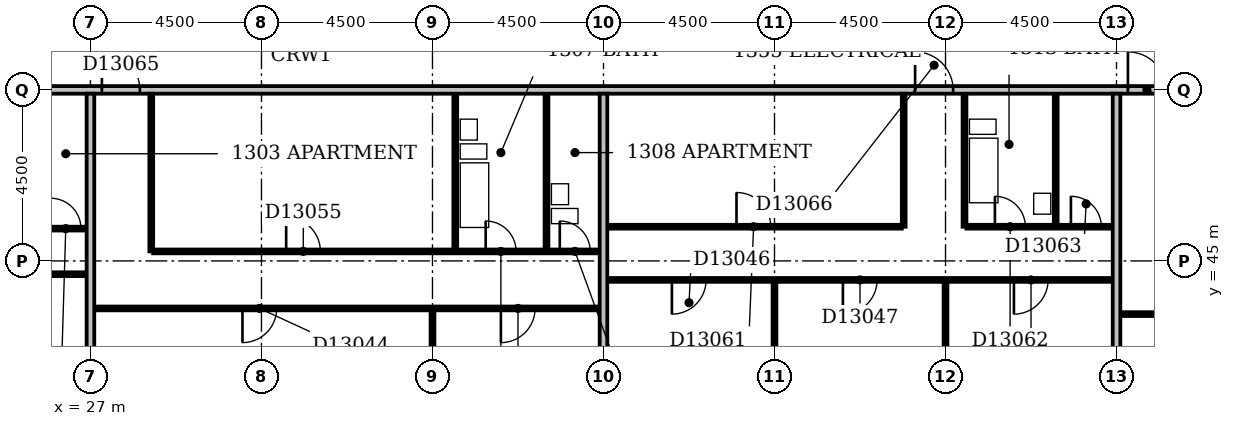
"""IFC4 building model, lengths in metres.
Left out: names, types, materials, properties, quantities, classifications, styles, units other than length and angle.
Written with IfcOpenShell. Run it as: python <this file> out.ifc"""

import sys

from ifc_helpers import new_model, si_unit, direction, frame, frame_2d, origin, place, context, subcontext, project, spatial, rectangle, extrude, element, fill, save


model = new_model("IFC4")
c1 = context("Model", 3, precision=1e-05, world=origin(), true_north=direction((0.0, 1.0)))
c2 = subcontext(c1, "Body", "Model", "MODEL_VIEW")
j1 = project(units=[si_unit("LENGTHUNIT", "METRE"), si_unit("PLANEANGLEUNIT", "RADIAN")], contexts=[c1])
p1 = place(None, origin())
s1 = spatial("IfcSite", under=j1, at=p1, CompositionType="ELEMENT")
p2 = place(p1, origin())
s2 = spatial("IfcBuilding", under=s1, at=p2, CompositionType="ELEMENT")
p3 = place(p2, frame((0.0, 0.0, 57.8)))
s3 = spatial("IfcBuildingStorey", under=s2, at=p3, CompositionType="ELEMENT", Elevation=57.8)
p4 = place(p3, frame((27.0, 36.6, 0.0), z_axis=(0.0, 0.0, 1.0), x_axis=(0.0, 1.0, 0.0)))
e1 = element("IfcWall", 1, at=p4, inside=s3, PredefinedType="PARTITIONING", context=c2, shape_type="SweptSolid", body=[
    extrude(rectangle(XDim=12.8, YDim=0.2, at=frame_2d((6.4, 0.0))), origin(), (0.0, 0.0, 1.0), 2.6),
])
p5 = place(p3, frame((36.0, 36.6, 0.0), z_axis=(0.0, 0.0, 1.0), x_axis=(0.0, 1.0, 0.0)))
e2 = element("IfcWall", 2, at=p5, inside=s3, PredefinedType="PARTITIONING", context=c2, shape_type="SweptSolid", body=[
    extrude(rectangle(XDim=7.1, YDim=0.1, at=frame_2d((3.55, 0.0))), origin(), (0.0, 0.0, 1.0), 2.4),
])
p6 = place(p3, frame((40.5, 36.6, 0.0), z_axis=(0.0, 0.0, 1.0), x_axis=(0.0, 1.0, 0.0)))
e3 = element("IfcWall", 3, at=p6, inside=s3, PredefinedType="PARTITIONING", context=c2, shape_type="SweptSolid", body=[
    extrude(rectangle(XDim=12.8, YDim=0.2, at=frame_2d((6.4, 0.0))), origin(), (0.0, 0.0, 1.0), 3.3),
])
p7 = place(p3, frame((45.0, 36.6, 0.0), z_axis=(0.0, 0.0, 1.0), x_axis=(0.0, 1.0, 0.0)))
e4 = element("IfcWall", 4, at=p7, inside=s3, PredefinedType="PARTITIONING", context=c2, shape_type="SweptSolid", body=[
    extrude(rectangle(XDim=7.85, YDim=0.1, at=frame_2d((3.925, 0.0))), origin(), (0.0, 0.0, 1.0), 2.6),
])
p8 = place(p3, frame((49.5, 36.6, 0.0), z_axis=(0.0, 0.0, 1.0), x_axis=(0.0, 1.0, 0.0)))
e5 = element("IfcWall", 5, at=p8, inside=s3, PredefinedType="PARTITIONING", context=c2, shape_type="SweptSolid", body=[
    extrude(rectangle(XDim=7.85, YDim=0.1, at=frame_2d((3.925, 0.0))), origin(), (0.0, 0.0, 1.0), 3.3),
])
p9 = place(p3, frame((54.0, 36.6, 0.0), z_axis=(0.0, 0.0, 1.0), x_axis=(0.0, 1.0, 0.0)))
e6 = element("IfcWall", 6, at=p9, inside=s3, PredefinedType="PARTITIONING", context=c2, shape_type="SweptSolid", body=[
    extrude(rectangle(XDim=12.8, YDim=0.2, at=frame_2d((6.4, 0.0))), origin(), (0.0, 0.0, 1.0), 2.6),
])
p10 = place(p3, frame((54.1, 43.6, 0.0), z_axis=(0.0, 0.0, 1.0), x_axis=(1.0, 0.0, 0.0)))
e7 = element("IfcWall", 7, at=p10, inside=s3, PredefinedType="PARTITIONING", context=c2, shape_type="SweptSolid", body=[
    extrude(rectangle(XDim=8.8, YDim=0.1, at=frame_2d((4.4, 0.0))), origin(), (0.0, 0.0, 1.0), 3.3),
])
p11 = place(p10, frame((1.7, 0.0, 0.0)))
e8 = element("IfcOpeningElement", 8, at=p11, cuts=e7, PredefinedType="OPENING", context=c2, shape_type="SweptSolid", body=[
    extrude(rectangle(XDim=0.9, YDim=2.1, at=frame_2d((0.45, 1.05))), frame((0.0, 0.062, 0.0), z_axis=(0.0, -1.0, 0.0), x_axis=(1.0, 0.0, 0.0)), (0.0, 0.0, 1.0), 0.124),
])
p12 = place(p10, frame((6.2, 0.0, 0.0)))
e9 = element("IfcOpeningElement", 9, at=p12, cuts=e7, PredefinedType="OPENING", context=c2, shape_type="SweptSolid", body=[
    extrude(rectangle(XDim=0.9, YDim=2.1, at=frame_2d((0.45, 1.05))), frame((0.0, 0.062, 0.0), z_axis=(0.0, -1.0, 0.0), x_axis=(1.0, 0.0, 0.0)), (0.0, 0.0, 1.0), 0.124),
])
p13 = place(p3, frame((27.1, 43.75, 0.0), z_axis=(0.0, 0.0, 1.0), x_axis=(1.0, 0.0, 0.0)))
e10 = element("IfcWall", 10, at=p13, inside=s3, PredefinedType="PARTITIONING", context=c2, shape_type="SweptSolid", body=[
    extrude(rectangle(XDim=13.3, YDim=0.1, at=frame_2d((6.65, 0.0))), origin(), (0.0, 0.0, 1.0), 3.3),
])
p14 = place(p13, frame((3.9, 0.0, 0.0)))
e11 = element("IfcOpeningElement", 11, at=p14, cuts=e10, PredefinedType="OPENING", context=c2, shape_type="SweptSolid", body=[
    extrude(rectangle(XDim=0.9, YDim=2.1, at=frame_2d((0.45, 1.05))), frame((0.0, 0.062, 0.0), z_axis=(0.0, -1.0, 0.0), x_axis=(1.0, 0.0, 0.0)), (0.0, 0.0, 1.0), 0.124),
])
p15 = place(p13, frame((10.7, 0.0, 0.0)))
e12 = element("IfcOpeningElement", 12, at=p15, cuts=e10, PredefinedType="OPENING", context=c2, shape_type="SweptSolid", body=[
    extrude(rectangle(XDim=0.9, YDim=2.1, at=frame_2d((0.45, 1.05))), frame((0.0, 0.062, 0.0), z_axis=(0.0, -1.0, 0.0), x_axis=(1.0, 0.0, 0.0)), (0.0, 0.0, 1.0), 0.124),
])
p16 = place(p3, frame((40.6, 44.5, 0.0), z_axis=(0.0, 0.0, 1.0), x_axis=(1.0, 0.0, 0.0)))
e13 = element("IfcWall", 13, at=p16, inside=s3, PredefinedType="PARTITIONING", context=c2, shape_type="SweptSolid", body=[
    extrude(rectangle(XDim=13.3, YDim=0.1, at=frame_2d((6.65, 0.0))), origin(), (0.0, 0.0, 1.0), 3.3),
])
p17 = place(p16, frame((1.7, 0.0, 0.0)))
e14 = element("IfcOpeningElement", 14, at=p17, cuts=e13, PredefinedType="OPENING", context=c2, shape_type="SweptSolid", body=[
    extrude(rectangle(XDim=0.9, YDim=2.1, at=frame_2d((0.45, 1.05))), frame((0.0, 0.062, 0.0), z_axis=(0.0, -1.0, 0.0), x_axis=(1.0, 0.0, 0.0)), (0.0, 0.0, 1.0), 0.124),
])
p18 = place(p16, frame((6.2, 0.0, 0.0)))
e15 = element("IfcOpeningElement", 15, at=p18, cuts=e13, PredefinedType="OPENING", context=c2, shape_type="SweptSolid", body=[
    extrude(rectangle(XDim=0.9, YDim=2.1, at=frame_2d((0.45, 1.05))), frame((0.0, 0.062, 0.0), z_axis=(0.0, -1.0, 0.0), x_axis=(1.0, 0.0, 0.0)), (0.0, 0.0, 1.0), 0.124),
])
p19 = place(p16, frame((10.7, 0.0, 0.0)))
e16 = element("IfcOpeningElement", 16, at=p19, cuts=e13, PredefinedType="OPENING", context=c2, shape_type="SweptSolid", body=[
    extrude(rectangle(XDim=0.9, YDim=2.1, at=frame_2d((0.45, 1.05))), frame((0.0, 0.062, 0.0), z_axis=(0.0, -1.0, 0.0), x_axis=(1.0, 0.0, 0.0)), (0.0, 0.0, 1.0), 0.124),
])
p20 = place(p3, frame((22.6, 44.65, 0.0), z_axis=(0.0, 0.0, 1.0), x_axis=(1.0, 0.0, 0.0)))
e17 = element("IfcWall", 17, at=p20, inside=s3, PredefinedType="PARTITIONING", context=c2, shape_type="SweptSolid", body=[
    extrude(rectangle(XDim=4.3, YDim=0.1, at=frame_2d((2.15, 0.0))), origin(), (0.0, 0.0, 1.0), 3.3),
])
p21 = place(p20, frame((1.7, 0.0, 0.0)))
e18 = element("IfcOpeningElement", 18, at=p21, cuts=e17, PredefinedType="OPENING", context=c2, shape_type="SweptSolid", body=[
    extrude(rectangle(XDim=0.9, YDim=2.1, at=frame_2d((0.45, 1.05))), frame((0.0, 0.062, 0.0), z_axis=(0.0, -1.0, 0.0), x_axis=(1.0, 0.0, 0.0)), (0.0, 0.0, 1.0), 0.124),
])
p22 = place(p3, frame((28.6, 45.25, 0.0), z_axis=(0.0, 0.0, 1.0), x_axis=(0.0, 1.0, 0.0)))
e19 = element("IfcWall", 19, at=p22, inside=s3, PredefinedType="PARTITIONING", context=c2, shape_type="SweptSolid", body=[
    extrude(rectangle(XDim=4.15, YDim=0.1, at=frame_2d((2.075, 0.0))), origin(), (0.0, 0.0, 1.0), 3.3),
])
p23 = place(p3, frame((28.65, 45.25, 0.0), z_axis=(0.0, 0.0, 1.0), x_axis=(1.0, 0.0, 0.0)))
e20 = element("IfcWall", 20, at=p23, inside=s3, PredefinedType="PARTITIONING", context=c2, shape_type="SweptSolid", body=[
    extrude(rectangle(XDim=11.75, YDim=0.1, at=frame_2d((5.875, 0.0))), origin(), (0.0, 0.0, 1.0), 3.3),
])
p24 = place(p23, frame((8.75, 0.0, 0.0)))
e21 = element("IfcOpeningElement", 21, at=p24, cuts=e20, PredefinedType="OPENING", context=c2, shape_type="SweptSolid", body=[
    extrude(rectangle(XDim=0.8, YDim=2.1, at=frame_2d((0.4, 1.05))), frame((0.0, 0.062, 0.0), z_axis=(0.0, -1.0, 0.0), x_axis=(1.0, 0.0, 0.0)), (0.0, 0.0, 1.0), 0.124),
])
p25 = place(p23, frame((3.5, 0.0, 0.0)))
e22 = element("IfcOpeningElement", 22, at=p25, cuts=e20, PredefinedType="OPENING", context=c2, shape_type="SweptSolid", body=[
    extrude(rectangle(XDim=0.9, YDim=2.1, at=frame_2d((0.45, 1.05))), frame((0.0, 0.062, 0.0), z_axis=(0.0, -1.0, 0.0), x_axis=(1.0, 0.0, 0.0)), (0.0, 0.0, 1.0), 0.124),
])
p26 = place(p23, frame((10.7, 0.0, 0.0)))
e23 = element("IfcOpeningElement", 23, at=p26, cuts=e20, PredefinedType="OPENING", context=c2, shape_type="SweptSolid", body=[
    extrude(rectangle(XDim=0.8, YDim=2.1, at=frame_2d((0.4, 1.05))), frame((0.0, 0.062, 0.0), z_axis=(0.0, -1.0, 0.0), x_axis=(1.0, 0.0, 0.0)), (0.0, 0.0, 1.0), 0.124),
])
p27 = place(p3, frame((36.6, 45.3, 0.0), z_axis=(0.0, 0.0, 1.0), x_axis=(0.0, 1.0, 0.0)))
e24 = element("IfcWall", 24, at=p27, inside=s3, PredefinedType="PLUMBINGWALL", context=c2, shape_type="SweptSolid", body=[
    extrude(rectangle(XDim=4.1, YDim=0.1, at=frame_2d((2.05, 0.0))), origin(), (0.0, 0.0, 1.0), 2.4),
])
p28 = place(p3, frame((39.0, 45.3, 0.0), z_axis=(0.0, 0.0, 1.0), x_axis=(0.0, 1.0, 0.0)))
e25 = element("IfcWall", 25, at=p28, inside=s3, PredefinedType="PLUMBINGWALL", context=c2, shape_type="SweptSolid", body=[
    extrude(rectangle(XDim=4.1, YDim=0.1, at=frame_2d((2.05, 0.0))), origin(), (0.0, 0.0, 1.0), 3.3),
])
p29 = place(p3, frame((25.75, 45.85, 0.0), z_axis=(0.0, 0.0, 1.0), x_axis=(1.0, 0.0, 0.0)))
e26 = element("IfcWall", 26, at=p29, inside=s3, PredefinedType="PARTITIONING", context=c2, shape_type="SweptSolid", body=[
    extrude(rectangle(XDim=1.15, YDim=0.1, at=frame_2d((0.575, 0.0))), origin(), (0.0, 0.0, 1.0), 3.3),
])
p30 = place(p29, frame((0.2, 0.0, 0.0)))
e27 = element("IfcOpeningElement", 27, at=p30, cuts=e26, PredefinedType="OPENING", context=c2, shape_type="SweptSolid", body=[
    extrude(rectangle(XDim=0.8, YDim=2.1, at=frame_2d((0.4, 1.05))), frame((0.0, 0.062, 0.0), z_axis=(0.0, -1.0, 0.0), x_axis=(1.0, 0.0, 0.0)), (0.0, 0.0, 1.0), 0.124),
])
p31 = place(p3, frame((40.6, 45.9, 0.0), z_axis=(0.0, 0.0, 1.0), x_axis=(1.0, 0.0, 0.0)))
e28 = element("IfcWall", 28, at=p31, inside=s3, PredefinedType="PARTITIONING", context=c2, shape_type="SweptSolid", body=[
    extrude(rectangle(XDim=7.75, YDim=0.1, at=frame_2d((3.875, 0.0))), origin(), (0.0, 0.0, 1.0), 3.3),
])
p32 = place(p31, frame((3.4, 0.0, 0.0)))
e29 = element("IfcOpeningElement", 29, at=p32, cuts=e28, PredefinedType="OPENING", context=c2, shape_type="SweptSolid", body=[
    extrude(rectangle(XDim=0.9, YDim=2.1, at=frame_2d((0.45, 1.05))), frame((0.0, 0.062, 0.0), z_axis=(0.0, -1.0, 0.0), x_axis=(1.0, 0.0, 0.0)), (0.0, 0.0, 1.0), 0.124),
])
p33 = place(p3, frame((48.4, 45.9, 0.0), z_axis=(0.0, 0.0, 1.0), x_axis=(0.0, 1.0, 0.0)))
e30 = element("IfcWall", 30, at=p33, inside=s3, PredefinedType="PARTITIONING", context=c2, shape_type="SweptSolid", body=[
    extrude(rectangle(XDim=3.5, YDim=0.1, at=frame_2d((1.75, 0.0))), origin(), (0.0, 0.0, 1.0), 3.3),
])
p34 = place(p3, frame((50.0, 45.9, 0.0), z_axis=(0.0, 0.0, 1.0), x_axis=(0.0, 1.0, 0.0)))
e31 = element("IfcWall", 31, at=p34, inside=s3, PredefinedType="PLUMBINGWALL", context=c2, shape_type="SweptSolid", body=[
    extrude(rectangle(XDim=3.5, YDim=0.1, at=frame_2d((1.75, 0.0))), origin(), (0.0, 0.0, 1.0), 3.3),
])
p35 = place(p3, frame((50.05, 45.9, 0.0), z_axis=(0.0, 0.0, 1.0), x_axis=(1.0, 0.0, 0.0)))
e32 = element("IfcWall", 32, at=p35, inside=s3, PredefinedType="PARTITIONING", context=c2, shape_type="SweptSolid", body=[
    extrude(rectangle(XDim=3.85, YDim=0.1, at=frame_2d((1.925, 0.0))), origin(), (0.0, 0.0, 1.0), 3.3),
])
p36 = place(p35, frame((0.75, 0.0, 0.0)))
e33 = element("IfcOpeningElement", 33, at=p36, cuts=e32, PredefinedType="OPENING", context=c2, shape_type="SweptSolid", body=[
    extrude(rectangle(XDim=0.8, YDim=2.1, at=frame_2d((0.4, 1.05))), frame((0.0, 0.062, 0.0), z_axis=(0.0, -1.0, 0.0), x_axis=(1.0, 0.0, 0.0)), (0.0, 0.0, 1.0), 0.124),
])
p37 = place(p35, frame((2.75, 0.0, 0.0)))
e34 = element("IfcOpeningElement", 34, at=p37, cuts=e32, PredefinedType="OPENING", context=c2, shape_type="SweptSolid", body=[
    extrude(rectangle(XDim=0.8, YDim=2.1, at=frame_2d((0.4, 1.05))), frame((0.0, 0.062, 0.0), z_axis=(0.0, -1.0, 0.0), x_axis=(1.0, 0.0, 0.0)), (0.0, 0.0, 1.0), 0.124),
])
p38 = place(p3, frame((52.4, 45.95, 0.0), z_axis=(0.0, 0.0, 1.0), x_axis=(0.0, 1.0, 0.0)))
e35 = element("IfcWall", 35, at=p38, inside=s3, PredefinedType="PLUMBINGWALL", context=c2, shape_type="SweptSolid", body=[
    extrude(rectangle(XDim=3.45, YDim=0.1, at=frame_2d((1.725, 0.0))), origin(), (0.0, 0.0, 1.0), 3.3),
])
p39 = place(p3, frame((9.1, 49.5, 0.0), z_axis=(0.0, 0.0, 1.0), x_axis=(1.0, 0.0, 0.0)))
e36 = element("IfcWall", 36, at=p39, inside=s3, PredefinedType="PARTITIONING", context=c2, shape_type="SweptSolid", body=[
    extrude(rectangle(XDim=57.8, YDim=0.2, at=frame_2d((28.9, 0.0))), origin(), (0.0, 0.0, 1.0), 3.3),
])
p40 = place(p39, frame((15.35, 0.0, 0.0)))
e37 = element("IfcOpeningElement", 37, at=p40, cuts=e36, PredefinedType="OPENING", context=c2, shape_type="SweptSolid", body=[
    extrude(rectangle(XDim=1.0, YDim=2.1, at=frame_2d((0.5, 1.05))), frame((0.0, 0.112, 0.0), z_axis=(0.0, -1.0, 0.0), x_axis=(1.0, 0.0, 0.0)), (0.0, 0.0, 1.0), 0.224),
])
p41 = place(p39, frame((18.2, 0.0, 0.0)))
e38 = element("IfcOpeningElement", 38, at=p41, cuts=e36, PredefinedType="OPENING", context=c2, shape_type="SweptSolid", body=[
    extrude(rectangle(XDim=1.0, YDim=2.1, at=frame_2d((0.5, 1.05))), frame((0.0, 0.112, 0.0), z_axis=(0.0, -1.0, 0.0), x_axis=(1.0, 0.0, 0.0)), (0.0, 0.0, 1.0), 0.224),
])
p42 = place(p39, frame((39.6, 0.0, 0.0)))
e39 = element("IfcOpeningElement", 39, at=p42, cuts=e36, PredefinedType="OPENING", context=c2, shape_type="SweptSolid", body=[
    extrude(rectangle(XDim=1.0, YDim=2.1, at=frame_2d((0.5, 1.05))), frame((0.0, 0.112, 0.0), z_axis=(0.0, -1.0, 0.0), x_axis=(1.0, 0.0, 0.0)), (0.0, 0.0, 1.0), 0.224),
])
p43 = place(p39, frame((45.2, 0.0, 0.0)))
e40 = element("IfcOpeningElement", 40, at=p43, cuts=e36, PredefinedType="OPENING", context=c2, shape_type="SweptSolid", body=[
    extrude(rectangle(XDim=1.0, YDim=2.1, at=frame_2d((0.5, 1.05))), frame((0.0, 0.112, 0.0), z_axis=(0.0, -1.0, 0.0), x_axis=(1.0, 0.0, 0.0)), (0.0, 0.0, 1.0), 0.224),
])
p44 = place(p39, frame((54.15, 0.0, 0.0)))
e41 = element("IfcOpeningElement", 41, at=p44, cuts=e36, PredefinedType="OPENING", context=c2, shape_type="SweptSolid", body=[
    extrude(rectangle(XDim=1.0, YDim=2.1, at=frame_2d((0.5, 1.05))), frame((0.0, 0.112, 0.0), z_axis=(0.0, -1.0, 0.0), x_axis=(1.0, 0.0, 0.0)), (0.0, 0.0, 1.0), 0.224),
])
p45 = place(p39, frame((6.15, 0.0, 0.0)))
e42 = element("IfcOpeningElement", 42, at=p45, cuts=e36, PredefinedType="OPENING", context=c2, shape_type="SweptSolid", body=[
    extrude(rectangle(XDim=0.9, YDim=2.1, at=frame_2d((0.45, 1.05))), frame((0.0, 0.112, 0.0), z_axis=(0.0, -1.0, 0.0), x_axis=(1.0, 0.0, 0.0)), (0.0, 0.0, 1.0), 0.224),
])
p46 = place(p14, frame((0.9, 0.0, 0.0), z_axis=(0.0, 0.0, 1.0), x_axis=(-1.0, 0.0, 0.0)))
e43 = element("IfcDoor", 43, at=p46, inside=s3, OperationType="SINGLE_SWING_RIGHT", PredefinedType="DOOR", context=c2, shape_type="SweptSolid", body=[
    extrude(rectangle(XDim=0.9, YDim=2.1, at=frame_2d((0.45, 1.05))), frame((0.0, 0.025, 0.0), z_axis=(0.0, -1.0, 0.0), x_axis=(1.0, 0.0, 0.0)), (0.0, 0.0, 1.0), 0.05),
])
fill(e11, e43)
p47 = place(p15, frame((0.9, 0.0, 0.0), z_axis=(0.0, 0.0, 1.0), x_axis=(-1.0, 0.0, 0.0)))
e44 = element("IfcDoor", 44, at=p47, inside=s3, OperationType="SINGLE_SWING_RIGHT", PredefinedType="DOOR", context=c2, shape_type="SweptSolid", body=[
    extrude(rectangle(XDim=0.9, YDim=2.1, at=frame_2d((0.45, 1.05))), frame((0.0, 0.025, 0.0), z_axis=(0.0, -1.0, 0.0), x_axis=(1.0, 0.0, 0.0)), (0.0, 0.0, 1.0), 0.05),
])
fill(e12, e44)
p48 = place(p17, frame((0.9, 0.0, 0.0), z_axis=(0.0, 0.0, 1.0), x_axis=(-1.0, 0.0, 0.0)))
e45 = element("IfcDoor", 45, at=p48, inside=s3, OperationType="SINGLE_SWING_RIGHT", PredefinedType="DOOR", context=c2, shape_type="SweptSolid", body=[
    extrude(rectangle(XDim=0.9, YDim=2.1, at=frame_2d((0.45, 1.05))), frame((0.0, 0.025, 0.0), z_axis=(0.0, -1.0, 0.0), x_axis=(1.0, 0.0, 0.0)), (0.0, 0.0, 1.0), 0.05),
])
fill(e14, e45)
p49 = place(p18, frame((0.9, 0.0, 0.0), z_axis=(0.0, 0.0, 1.0), x_axis=(-1.0, 0.0, 0.0)))
e46 = element("IfcDoor", 46, at=p49, inside=s3, OperationType="SINGLE_SWING_RIGHT", PredefinedType="DOOR", context=c2, shape_type="SweptSolid", body=[
    extrude(rectangle(XDim=0.9, YDim=2.1, at=frame_2d((0.45, 1.05))), frame((0.0, 0.025, 0.0), z_axis=(0.0, -1.0, 0.0), x_axis=(1.0, 0.0, 0.0)), (0.0, 0.0, 1.0), 0.05),
])
fill(e15, e46)
p50 = place(p19, frame((0.9, 0.0, 0.0), z_axis=(0.0, 0.0, 1.0), x_axis=(-1.0, 0.0, 0.0)))
e47 = element("IfcDoor", 47, at=p50, inside=s3, OperationType="SINGLE_SWING_RIGHT", PredefinedType="DOOR", context=c2, shape_type="SweptSolid", body=[
    extrude(rectangle(XDim=0.9, YDim=2.1, at=frame_2d((0.45, 1.05))), frame((0.0, 0.025, 0.0), z_axis=(0.0, -1.0, 0.0), x_axis=(1.0, 0.0, 0.0)), (0.0, 0.0, 1.0), 0.05),
])
fill(e16, e47)
p51 = place(p24, origin())
e48 = element("IfcDoor", 48, at=p51, inside=s3, OperationType="SINGLE_SWING_LEFT", PredefinedType="DOOR", context=c2, shape_type="SweptSolid", body=[
    extrude(rectangle(XDim=0.8, YDim=2.1, at=frame_2d((0.4, 1.05))), frame((0.0, 0.025, 0.0), z_axis=(0.0, -1.0, 0.0), x_axis=(1.0, 0.0, 0.0)), (0.0, 0.0, 1.0), 0.05),
])
fill(e21, e48)
p52 = place(p25, origin())
e49 = element("IfcDoor", 49, at=p52, inside=s3, OperationType="SINGLE_SWING_LEFT", PredefinedType="DOOR", context=c2, shape_type="SweptSolid", body=[
    extrude(rectangle(XDim=0.9, YDim=2.1, at=frame_2d((0.45, 1.05))), frame((0.0, 0.025, 0.0), z_axis=(0.0, -1.0, 0.0), x_axis=(1.0, 0.0, 0.0)), (0.0, 0.0, 1.0), 0.05),
])
fill(e22, e49)
p53 = place(p26, origin())
e50 = element("IfcDoor", 50, at=p53, inside=s3, OperationType="SINGLE_SWING_LEFT", PredefinedType="DOOR", context=c2, shape_type="SweptSolid", body=[
    extrude(rectangle(XDim=0.8, YDim=2.1, at=frame_2d((0.4, 1.05))), frame((0.0, 0.025, 0.0), z_axis=(0.0, -1.0, 0.0), x_axis=(1.0, 0.0, 0.0)), (0.0, 0.0, 1.0), 0.05),
])
fill(e23, e50)
p54 = place(p30, origin())
e51 = element("IfcDoor", 51, at=p54, inside=s3, OperationType="SINGLE_SWING_LEFT", PredefinedType="DOOR", context=c2, shape_type="SweptSolid", body=[
    extrude(rectangle(XDim=0.8, YDim=2.1, at=frame_2d((0.4, 1.05))), frame((0.0, 0.025, 0.0), z_axis=(0.0, -1.0, 0.0), x_axis=(1.0, 0.0, 0.0)), (0.0, 0.0, 1.0), 0.05),
])
fill(e27, e51)
p55 = place(p32, origin())
e52 = element("IfcDoor", 52, at=p55, inside=s3, OperationType="SINGLE_SWING_LEFT", PredefinedType="DOOR", context=c2, shape_type="SweptSolid", body=[
    extrude(rectangle(XDim=0.9, YDim=2.1, at=frame_2d((0.45, 1.05))), frame((0.0, 0.025, 0.0), z_axis=(0.0, -1.0, 0.0), x_axis=(1.0, 0.0, 0.0)), (0.0, 0.0, 1.0), 0.05),
])
fill(e29, e52)
p56 = place(p36, origin())
e53 = element("IfcDoor", 53, at=p56, inside=s3, OperationType="SINGLE_SWING_LEFT", PredefinedType="DOOR", context=c2, shape_type="SweptSolid", body=[
    extrude(rectangle(XDim=0.8, YDim=2.1, at=frame_2d((0.4, 1.05))), frame((0.0, 0.025, 0.0), z_axis=(0.0, -1.0, 0.0), x_axis=(1.0, 0.0, 0.0)), (0.0, 0.0, 1.0), 0.05),
])
fill(e33, e53)
p57 = place(p37, origin())
e54 = element("IfcDoor", 54, at=p57, inside=s3, OperationType="SINGLE_SWING_LEFT", PredefinedType="DOOR", context=c2, shape_type="SweptSolid", body=[
    extrude(rectangle(XDim=0.8, YDim=2.1, at=frame_2d((0.4, 1.05))), frame((0.0, 0.025, 0.0), z_axis=(0.0, -1.0, 0.0), x_axis=(1.0, 0.0, 0.0)), (0.0, 0.0, 1.0), 0.05),
])
fill(e34, e54)
p58 = place(p41, origin())
e55 = element("IfcDoor", 55, at=p58, inside=s3, OperationType="SINGLE_SWING_LEFT", PredefinedType="DOOR", context=c2, shape_type="SweptSolid", body=[
    extrude(rectangle(XDim=1.0, YDim=2.1, at=frame_2d((0.5, 1.05))), frame((0.0, 0.025, 0.0), z_axis=(0.0, -1.0, 0.0), x_axis=(1.0, 0.0, 0.0)), (0.0, 0.0, 1.0), 0.05),
])
fill(e38, e55)
p59 = place(p42, origin())
e56 = element("IfcDoor", 56, at=p59, inside=s3, OperationType="SINGLE_SWING_LEFT", PredefinedType="DOOR", context=c2, shape_type="SweptSolid", body=[
    extrude(rectangle(XDim=1.0, YDim=2.1, at=frame_2d((0.5, 1.05))), frame((0.0, 0.025, 0.0), z_axis=(0.0, -1.0, 0.0), x_axis=(1.0, 0.0, 0.0)), (0.0, 0.0, 1.0), 0.05),
])
fill(e39, e56)
p60 = place(p43, origin())
e57 = element("IfcDoor", 57, at=p60, inside=s3, OperationType="SINGLE_SWING_LEFT", PredefinedType="DOOR", context=c2, shape_type="SweptSolid", body=[
    extrude(rectangle(XDim=1.0, YDim=2.1, at=frame_2d((0.5, 1.05))), frame((0.0, 0.025, 0.0), z_axis=(0.0, -1.0, 0.0), x_axis=(1.0, 0.0, 0.0)), (0.0, 0.0, 1.0), 0.05),
])
fill(e40, e57)
save(model, sys.argv[1])
